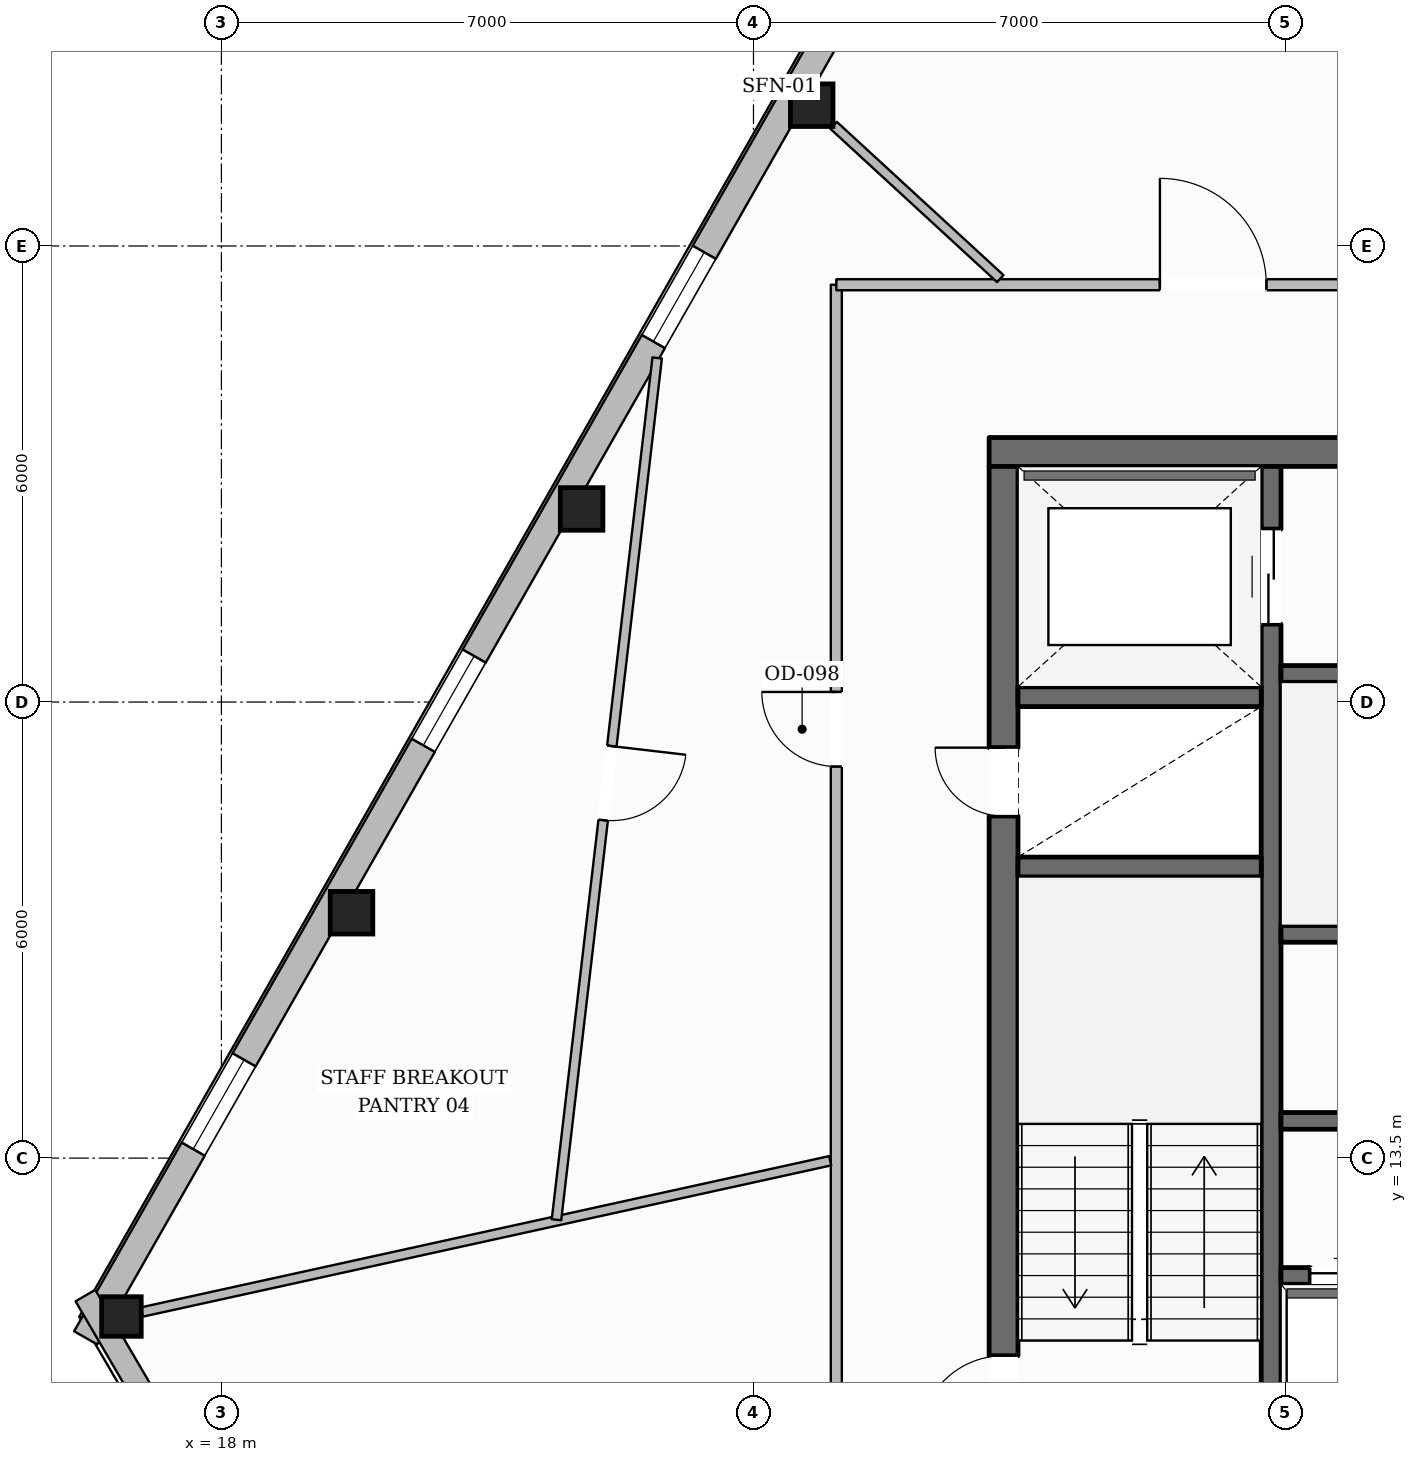
"""IFC4 building model, lengths in metres.
Left out: names, types, materials, properties, quantities, classifications, styles, units other than length and angle.
Written with IfcOpenShell. Run it as: python <this file> out.ifc"""

import sys

from ifc_helpers import new_model, si_unit, direction, frame, frame_2d, origin, origin_2d, place, context, subcontext, project, spatial, rectangle, hollow_rectangle, extrude, element, fill, save


model = new_model("IFC4")
c1 = context("Model", 3, precision=1e-05, world=origin(), true_north=direction((0.0, 1.0)))
c2 = subcontext(c1, "Body", "Model", "MODEL_VIEW")
j1 = project(units=[si_unit("LENGTHUNIT", "METRE"), si_unit("PLANEANGLEUNIT", "RADIAN")], contexts=[c1])
p1 = place(None, origin())
s1 = spatial("IfcSite", under=j1, at=p1, CompositionType="ELEMENT")
p2 = place(p1, origin())
s2 = spatial("IfcBuilding", under=s1, at=p2, CompositionType="ELEMENT")
p3 = place(p2, frame((0.0, 0.0, 254.9)))
s3 = spatial("IfcBuildingStorey", under=s2, at=p3, CompositionType="ELEMENT", Elevation=254.9)
p4 = place(p3, frame((28.1, 22.79, 0.0), z_axis=(0.0, 0.0, 1.0), x_axis=(1.0, 0.0, 0.0)))
e1 = element("IfcWall", 1, at=p4, inside=s3, PredefinedType="SOLIDWALL", context=c2, shape_type="SweptSolid", body=[
    extrude(rectangle(XDim=19.8, YDim=0.38, at=frame_2d((9.9, 0.0))), origin(), (0.0, 0.0, 1.0), 3.61),
])
p5 = place(p4, frame((6.175, 0.0, 0.0)))
e2 = element("IfcOpeningElement", 2, at=p5, cuts=e1, PredefinedType="OPENING", context=c2, shape_type="SweptSolid", body=[
    extrude(rectangle(XDim=1.05, YDim=2.15, at=frame_2d((0.525, 1.075))), frame((0.0, 0.2, 0.0), z_axis=(0.0, -1.0, 0.0), x_axis=(1.0, 0.0, 0.0)), (0.0, 0.0, 1.0), 0.4),
])
p6 = place(p4, frame((12.575, 0.0, 0.0)))
e3 = element("IfcOpeningElement", 3, at=p6, cuts=e1, PredefinedType="OPENING", context=c2, shape_type="SweptSolid", body=[
    extrude(rectangle(XDim=1.05, YDim=2.15, at=frame_2d((0.525, 1.075))), frame((0.0, 0.2, 0.0), z_axis=(0.0, -1.0, 0.0), x_axis=(1.0, 0.0, 0.0)), (0.0, 0.0, 1.0), 0.4),
])
p7 = place(p3, frame((28.29, 9.6, 0.0), z_axis=(0.0, 0.0, 1.0), x_axis=(0.0, 1.0, 0.0)))
e4 = element("IfcWall", 4, at=p7, inside=s3, PredefinedType="SOLIDWALL", context=c2, shape_type="SweptSolid", body=[
    extrude(rectangle(XDim=13.0, YDim=0.38, at=frame_2d((6.5, 0.0))), origin(), (0.0, 0.0, 1.0), 3.61),
])
p8 = place(p7, frame((0.2, 0.0, 0.0)))
e5 = element("IfcOpeningElement", 5, at=p8, cuts=e4, PredefinedType="OPENING", context=c2, shape_type="SweptSolid", body=[
    extrude(rectangle(XDim=1.1, YDim=2.15, at=frame_2d((0.55, 1.075))), frame((0.0, 0.2, 0.0), z_axis=(0.0, -1.0, 0.0), x_axis=(1.0, 0.0, 0.0)), (0.0, 0.0, 1.0), 0.4),
])
p9 = place(p7, frame((8.4, 0.0, 0.0)))
e6 = element("IfcOpeningElement", 6, at=p9, cuts=e4, PredefinedType="OPENING", context=c2, shape_type="SweptSolid", body=[
    extrude(rectangle(XDim=0.9, YDim=2.1, at=frame_2d((0.45, 1.05))), frame((0.0, 0.2, 0.0), z_axis=(0.0, -1.0, 0.0), x_axis=(1.0, 0.0, 0.0)), (0.0, 0.0, 1.0), 0.4),
])
p10 = place(p3, frame((31.81, 9.6, 0.0), z_axis=(0.0, 0.0, 1.0), x_axis=(0.0, 1.0, 0.0)))
e7 = element("IfcWall", 7, at=p10, inside=s3, PredefinedType="SHEAR", context=c2, shape_type="SweptSolid", body=[
    extrude(rectangle(XDim=13.0, YDim=0.26, at=frame_2d((6.5, 0.0))), origin(), (0.0, 0.0, 1.0), 3.61),
])
p11 = place(p10, frame((10.925, 0.0, 0.0)))
e8 = element("IfcOpeningElement", 8, at=p11, cuts=e7, PredefinedType="OPENING", context=c2, shape_type="SweptSolid", body=[
    extrude(rectangle(XDim=1.25, YDim=2.25, at=frame_2d((0.625, 1.125))), frame((0.0, 0.14, 0.0), z_axis=(0.0, -1.0, 0.0), x_axis=(1.0, 0.0, 0.0)), (0.0, 0.0, 1.0), 0.28),
])
for number, where, z_axis, x_axis in (
    (9, (28.48, 17.33, 0.0), (0.0, 0.0, 1.0), (1.0, 0.0, 0.0)),
    (10, (28.48, 19.57, 0.0), (0.0, 0.0, 1.0), (1.0, 0.0, 0.0)),
):
    element("IfcWall", number, at=place(p3, frame(where, z_axis=z_axis, x_axis=x_axis)), inside=s3, PredefinedType="SHEAR", context=c2, shape_type="SweptSolid", body=[
        extrude(rectangle(XDim=3.2, YDim=0.26, at=frame_2d((1.6, 0.0))), origin(), (0.0, 0.0, 1.0), 3.61),
    ])
p12 = place(p3, frame((31.94, 19.87, 0.0), z_axis=(0.0, 0.0, 1.0), x_axis=(1.0, 0.0, 0.0)))
e11 = element("IfcWall", 11, at=p12, inside=s3, PredefinedType="SOLIDWALL", context=c2, shape_type="SweptSolid", body=[
    extrude(rectangle(XDim=12.12, YDim=0.22, at=frame_2d((6.06, 0.0))), origin(), (0.0, 0.0, 1.0), 3.61),
])
p13 = place(p12, frame((6.3, 0.0, 0.0)))
e12 = element("IfcOpeningElement", 12, at=p13, cuts=e11, PredefinedType="OPENING", context=c2, shape_type="SweptSolid", body=[
    extrude(rectangle(XDim=1.1, YDim=2.15, at=frame_2d((0.55, 1.075))), frame((0.0, 0.12, 0.0), z_axis=(0.0, -1.0, 0.0), x_axis=(1.0, 0.0, 0.0)), (0.0, 0.0, 1.0), 0.24),
])
p14 = place(p12, frame((9.51, 0.0, 0.0)))
e13 = element("IfcOpeningElement", 13, at=p14, cuts=e11, PredefinedType="OPENING", context=c2, shape_type="SweptSolid", body=[
    extrude(rectangle(XDim=0.9, YDim=2.1, at=frame_2d((0.45, 1.05))), frame((0.0, 0.12, 0.0), z_axis=(0.0, -1.0, 0.0), x_axis=(1.0, 0.0, 0.0)), (0.0, 0.0, 1.0), 0.24),
])
p15 = place(p3, frame((31.94, 16.45, 0.0), z_axis=(0.0, 0.0, 1.0), x_axis=(1.0, 0.0, 0.0)))
e14 = element("IfcWall", 14, at=p15, inside=s3, PredefinedType="SOLIDWALL", context=c2, shape_type="SweptSolid", body=[
    extrude(rectangle(XDim=12.12, YDim=0.22, at=frame_2d((6.06, 0.0))), origin(), (0.0, 0.0, 1.0), 3.61),
])
p16 = place(p3, frame((31.94, 13.99, 0.0), z_axis=(0.0, 0.0, 1.0), x_axis=(1.0, 0.0, 0.0)))
e15 = element("IfcWall", 15, at=p16, inside=s3, PredefinedType="SOLIDWALL", context=c2, shape_type="SweptSolid", body=[
    extrude(rectangle(XDim=12.12, YDim=0.22, at=frame_2d((6.06, 0.0))), origin(), (0.0, 0.0, 1.0), 3.61),
])
p17 = place(p16, frame((1.11, 0.0, 0.0)))
e16 = element("IfcOpeningElement", 16, at=p17, cuts=e15, PredefinedType="OPENING", context=c2, shape_type="SweptSolid", body=[
    extrude(rectangle(XDim=0.9, YDim=2.1, at=frame_2d((0.45, 1.05))), frame((0.0, 0.12, 0.0), z_axis=(0.0, -1.0, 0.0), x_axis=(1.0, 0.0, 0.0)), (0.0, 0.0, 1.0), 0.24),
])
p18 = place(p16, frame((5.16, 0.0, 0.0)))
e17 = element("IfcOpeningElement", 17, at=p18, cuts=e15, PredefinedType="OPENING", context=c2, shape_type="SweptSolid", body=[
    extrude(rectangle(XDim=0.9, YDim=2.1, at=frame_2d((0.45, 1.05))), frame((0.0, 0.12, 0.0), z_axis=(0.0, -1.0, 0.0), x_axis=(1.0, 0.0, 0.0)), (0.0, 0.0, 1.0), 0.24),
])
p19 = place(p16, frame((9.61, 0.0, 0.0)))
e18 = element("IfcOpeningElement", 18, at=p19, cuts=e15, PredefinedType="OPENING", context=c2, shape_type="SweptSolid", body=[
    extrude(rectangle(XDim=0.9, YDim=2.1, at=frame_2d((0.45, 1.05))), frame((0.0, 0.12, 0.0), z_axis=(0.0, -1.0, 0.0), x_axis=(1.0, 0.0, 0.0)), (0.0, 0.0, 1.0), 0.24),
])
p20 = place(p3, frame((31.94, 11.95, 0.0), z_axis=(0.0, 0.0, 1.0), x_axis=(1.0, 0.0, 0.0)))
e19 = element("IfcWall", 19, at=p20, inside=s3, PredefinedType="SOLIDWALL", context=c2, shape_type="SweptSolid", body=[
    extrude(rectangle(XDim=6.19, YDim=0.22, at=frame_2d((3.095, 0.0))), origin(), (0.0, 0.0, 1.0), 3.61),
])
p21 = place(p20, frame((0.385, 0.0, 0.0)))
e20 = element("IfcOpeningElement", 20, at=p21, cuts=e19, PredefinedType="OPENING", context=c2, shape_type="SweptSolid", body=[
    extrude(rectangle(XDim=1.1, YDim=2.2, at=frame_2d((0.55, 1.1))), frame((0.0, 0.12, 0.0), z_axis=(0.0, -1.0, 0.0), x_axis=(1.0, 0.0, 0.0)), (0.0, 0.0, 1.0), 0.24),
])
p22 = place(p20, frame((2.435, 0.0, 0.0)))
e21 = element("IfcOpeningElement", 21, at=p22, cuts=e19, PredefinedType="OPENING", context=c2, shape_type="SweptSolid", body=[
    extrude(rectangle(XDim=1.1, YDim=2.2, at=frame_2d((0.55, 1.1))), frame((0.0, 0.12, 0.0), z_axis=(0.0, -1.0, 0.0), x_axis=(1.0, 0.0, 0.0)), (0.0, 0.0, 1.0), 0.24),
])
p23 = place(p20, frame((4.485, 0.0, 0.0)))
e22 = element("IfcOpeningElement", 22, at=p23, cuts=e19, PredefinedType="OPENING", context=c2, shape_type="SweptSolid", body=[
    extrude(rectangle(XDim=1.1, YDim=2.2, at=frame_2d((0.55, 1.1))), frame((0.0, 0.12, 0.0), z_axis=(0.0, -1.0, 0.0), x_axis=(1.0, 0.0, 0.0)), (0.0, 0.0, 1.0), 0.24),
])
for number, where, z_axis, x_axis in (
    (23, (25.766, 27.352, 0.0), (0.0, 0.0, 1.0), (1.0, 0.0, 0.0)),
    (24, (22.739, 22.04, 0.0), (0.0, 0.0, 1.0), (1.0, 0.0, 0.0)),
    (25, (19.712, 16.728, 0.0), (0.0, 0.0, 1.0), (1.0, 0.0, 0.0)),
):
    element("IfcColumn", number, at=place(p3, frame(where, z_axis=z_axis, x_axis=x_axis)), inside=s3, PredefinedType="COLUMN", context=c2, shape_type="SweptSolid", body=[
        extrude(hollow_rectangle(XDim=0.56, YDim=0.56, WallThickness=0.025, at=origin_2d()), origin(), (0.0, 0.0, 1.0), 3.61),
    ])
p24 = place(p3, frame((16.685, 11.416, 0.0), z_axis=(0.0, 0.0, 1.0), x_axis=(1.0, 0.0, 0.0)))
e26 = element("IfcColumn", 26, at=p24, inside=s3, PredefinedType="COLUMN", context=c2, shape_type="SweptSolid", body=[
    extrude(hollow_rectangle(XDim=0.52, YDim=0.52, WallThickness=0.024, at=origin_2d()), origin(), (0.0, 0.0, 1.0), 3.61),
])
p25 = place(p3, frame((16.214, 11.135, 0.0), z_axis=(0.0, 0.0, 1.0), x_axis=(0.49510347201, 0.868834018673, 0.0)))
e27 = element("IfcWall", 27, at=p25, inside=s3, PredefinedType="STANDARD", context=c2, shape_type="SweptSolid", body=[
    extrude(rectangle(XDim=37.643, YDim=0.35, at=frame_2d((18.822, 0.0))), origin(), (0.0, 0.0, 1.0), 3.196),
])
p26 = place(p25, frame((33.429, 0.0, 0.65)))
e28 = element("IfcOpeningElement", 28, at=p26, cuts=e27, PredefinedType="OPENING", context=c2, shape_type="SweptSolid", body=[
    extrude(rectangle(XDim=1.35, YDim=1.75, at=frame_2d((0.675, 0.875))), frame((0.0, 0.185, 0.0), z_axis=(0.0, -1.0, 0.0), x_axis=(1.0, 0.0, 0.0)), (0.0, 0.0, 1.0), 0.37),
])
p27 = place(p25, frame((27.315, 0.0, 0.65)))
e29 = element("IfcOpeningElement", 29, at=p27, cuts=e27, PredefinedType="OPENING", context=c2, shape_type="SweptSolid", body=[
    extrude(rectangle(XDim=1.35, YDim=1.75, at=frame_2d((0.675, 0.875))), frame((0.0, 0.185, 0.0), z_axis=(0.0, -1.0, 0.0), x_axis=(1.0, 0.0, 0.0)), (0.0, 0.0, 1.0), 0.37),
])
p28 = place(p25, frame((15.087, 0.0, 0.65)))
e30 = element("IfcOpeningElement", 30, at=p28, cuts=e27, PredefinedType="OPENING", context=c2, shape_type="SweptSolid", body=[
    extrude(rectangle(XDim=1.35, YDim=1.75, at=frame_2d((0.675, 0.875))), frame((0.0, 0.185, 0.0), z_axis=(0.0, -1.0, 0.0), x_axis=(1.0, 0.0, 0.0)), (0.0, 0.0, 1.0), 0.37),
])
p29 = place(p25, frame((8.973, 0.0, 0.65)))
e31 = element("IfcOpeningElement", 31, at=p29, cuts=e27, PredefinedType="OPENING", context=c2, shape_type="SweptSolid", body=[
    extrude(rectangle(XDim=1.35, YDim=1.75, at=frame_2d((0.675, 0.875))), frame((0.0, 0.185, 0.0), z_axis=(0.0, -1.0, 0.0), x_axis=(1.0, 0.0, 0.0)), (0.0, 0.0, 1.0), 0.37),
])
p30 = place(p25, frame((2.859, 0.0, 0.65)))
e32 = element("IfcOpeningElement", 32, at=p30, cuts=e27, PredefinedType="OPENING", context=c2, shape_type="SweptSolid", body=[
    extrude(rectangle(XDim=1.35, YDim=1.75, at=frame_2d((0.675, 0.875))), frame((0.0, 0.185, 0.0), z_axis=(0.0, -1.0, 0.0), x_axis=(1.0, 0.0, 0.0)), (0.0, 0.0, 1.0), 0.37),
])
p31 = place(p3, frame((19.979, 5.248, 0.0), z_axis=(0.0, 0.0, 1.0), x_axis=(-0.50480008765, 0.863236277915, 0.0)))
e33 = element("IfcWall", 33, at=p31, inside=s3, PredefinedType="STANDARD", context=c2, shape_type="SweptSolid", body=[
    extrude(rectangle(XDim=7.464, YDim=0.3, at=frame_2d((3.732, 0.0))), origin(), (0.0, 0.0, 1.0), 3.196),
])
p32 = place(p31, frame((3.207, 0.0, 0.65)))
e34 = element("IfcOpeningElement", 34, at=p32, cuts=e33, PredefinedType="OPENING", context=c2, shape_type="SweptSolid", body=[
    extrude(rectangle(XDim=1.05, YDim=1.7, at=frame_2d((0.525, 0.85))), frame((0.0, 0.16, 0.0), z_axis=(0.0, -1.0, 0.0), x_axis=(1.0, 0.0, 0.0)), (0.0, 0.0, 1.0), 0.32),
])
p33 = place(p3, frame((26.09, 7.21, 0.0), z_axis=(0.0, 0.0, 1.0), x_axis=(0.0, 1.0, 0.0)))
e35 = element("IfcWall", 35, at=p33, inside=s3, PredefinedType="PARTITIONING", context=c2, shape_type="SweptSolid", body=[
    extrude(rectangle(XDim=17.78, YDim=0.145, at=frame_2d((8.89, 0.0))), origin(), (0.0, 0.0, 1.0), 3.349),
])
p34 = place(p33, frame((11.443, 0.0, 0.0)))
e36 = element("IfcOpeningElement", 36, at=p34, cuts=e35, PredefinedType="OPENING", context=c2, shape_type="SweptSolid", body=[
    extrude(rectangle(XDim=0.98, YDim=2.15, at=frame_2d((0.49, 1.075))), frame((0.0, 0.083, 0.0), z_axis=(0.0, -1.0, 0.0), x_axis=(1.0, 0.0, 0.0)), (0.0, 0.0, 1.0), 0.165),
])
p35 = place(p3, frame((26.09, 24.99, 0.0), z_axis=(0.0, 0.0, 1.0), x_axis=(1.0, 0.0, 0.0)))
e37 = element("IfcWall", 37, at=p35, inside=s3, PredefinedType="PARTITIONING", context=c2, shape_type="SweptSolid", body=[
    extrude(rectangle(XDim=17.11, YDim=0.145, at=frame_2d((8.555, 0.0))), origin(), (0.0, 0.0, 1.0), 3.61),
])
p36 = place(p35, frame((8.47, 0.0, 0.0)))
e38 = element("IfcOpeningElement", 38, at=p36, cuts=e37, PredefinedType="OPENING", context=c2, shape_type="SweptSolid", body=[
    extrude(rectangle(XDim=0.88, YDim=2.1, at=frame_2d((0.44, 1.05))), frame((0.0, 0.083, 0.0), z_axis=(0.0, -1.0, 0.0), x_axis=(1.0, 0.0, 0.0)), (0.0, 0.0, 1.0), 0.165),
])
p37 = place(p35, frame((10.99, 0.0, 0.0)))
e39 = element("IfcOpeningElement", 39, at=p37, cuts=e37, PredefinedType="OPENING", context=c2, shape_type="SweptSolid", body=[
    extrude(rectangle(XDim=0.88, YDim=2.1, at=frame_2d((0.44, 1.05))), frame((0.0, 0.083, 0.0), z_axis=(0.0, -1.0, 0.0), x_axis=(1.0, 0.0, 0.0)), (0.0, 0.0, 1.0), 0.165),
])
p38 = place(p35, frame((13.37, 0.0, 0.0)))
e40 = element("IfcOpeningElement", 40, at=p38, cuts=e37, PredefinedType="OPENING", context=c2, shape_type="SweptSolid", body=[
    extrude(rectangle(XDim=0.96, YDim=2.1, at=frame_2d((0.48, 1.05))), frame((0.0, 0.083, 0.0), z_axis=(0.0, -1.0, 0.0), x_axis=(1.0, 0.0, 0.0)), (0.0, 0.0, 1.0), 0.165),
])
p39 = place(p35, frame((4.257, 0.0, 0.0)))
e41 = element("IfcOpeningElement", 41, at=p39, cuts=e37, PredefinedType="OPENING", context=c2, shape_type="SweptSolid", body=[
    extrude(rectangle(XDim=1.4, YDim=2.2, at=frame_2d((0.7, 1.1))), frame((0.0, 0.083, 0.0), z_axis=(0.0, -1.0, 0.0), x_axis=(1.0, 0.0, 0.0)), (0.0, 0.0, 1.0), 0.165),
])
p40 = place(p3, frame((28.247, 25.071, 0.0), z_axis=(0.0, 0.0, 1.0), x_axis=(-0.736030630255, 0.67694823386, 0.0)))
e42 = element("IfcWall", 42, at=p40, inside=s3, PredefinedType="PARTITIONING", context=c2, shape_type="SweptSolid", body=[
    extrude(rectangle(XDim=2.979, YDim=0.125, at=frame_2d((1.49, 0.0))), origin(), (0.0, 0.0, 1.0), 3.61),
])
p41 = place(p3, frame((26.01, 13.465, 0.0), z_axis=(0.0, 0.0, 1.0), x_axis=(-0.976700346334, -0.214607626778, 0.0)))
e43 = element("IfcWall", 43, at=p41, inside=s3, PredefinedType="PARTITIONING", context=c2, shape_type="SweptSolid", body=[
    extrude(rectangle(XDim=9.273, YDim=0.125, at=frame_2d((4.636, 0.0))), origin(), (0.0, 0.0, 1.0), 3.246),
])
p42 = place(p3, frame((23.733, 24.027, 0.0), z_axis=(0.0, 0.0, 1.0), x_axis=(-0.116028401935, -0.993245896012, 0.0)))
e44 = element("IfcWall", 44, at=p42, inside=s3, PredefinedType="PARTITIONING", context=c2, shape_type="SweptSolid", body=[
    extrude(rectangle(XDim=11.415, YDim=0.125, at=frame_2d((5.708, 0.0))), origin(), (0.0, 0.0, 1.0), 3.199),
])
p43 = place(p42, frame((5.142, 0.0, 0.0)))
e45 = element("IfcOpeningElement", 45, at=p43, cuts=e44, PredefinedType="OPENING", context=c2, shape_type="SweptSolid", body=[
    extrude(rectangle(XDim=0.98, YDim=2.15, at=frame_2d((0.49, 1.075))), frame((0.0, 0.073, 0.0), z_axis=(0.0, -1.0, 0.0), x_axis=(1.0, 0.0, 0.0)), (0.0, 0.0, 1.0), 0.145),
])
p44 = place(p28, origin())
e46 = element("IfcWindow", 46, at=p44, inside=s3, PartitioningType="SINGLE_PANEL", PredefinedType="WINDOW", context=c2, shape_type="SweptSolid", body=[
    extrude(rectangle(XDim=1.35, YDim=1.75, at=frame_2d((0.675, 0.875))), frame((0.0, 0.03, 0.0), z_axis=(0.0, -1.0, 0.0), x_axis=(1.0, 0.0, 0.0)), (0.0, 0.0, 1.0), 0.06),
])
fill(e30, e46)
p45 = place(p29, origin())
e47 = element("IfcWindow", 47, at=p45, inside=s3, PartitioningType="SINGLE_PANEL", PredefinedType="WINDOW", context=c2, shape_type="SweptSolid", body=[
    extrude(rectangle(XDim=1.35, YDim=1.75, at=frame_2d((0.675, 0.875))), frame((0.0, 0.03, 0.0), z_axis=(0.0, -1.0, 0.0), x_axis=(1.0, 0.0, 0.0)), (0.0, 0.0, 1.0), 0.06),
])
fill(e31, e47)
p46 = place(p30, origin())
e48 = element("IfcWindow", 48, at=p46, inside=s3, PartitioningType="SINGLE_PANEL", PredefinedType="WINDOW", context=c2, shape_type="SweptSolid", body=[
    extrude(rectangle(XDim=1.35, YDim=1.75, at=frame_2d((0.675, 0.875))), frame((0.0, 0.03, 0.0), z_axis=(0.0, -1.0, 0.0), x_axis=(1.0, 0.0, 0.0)), (0.0, 0.0, 1.0), 0.06),
])
fill(e32, e48)
p47 = place(p8, origin())
e49 = element("IfcDoor", 49, at=p47, inside=s3, OperationType="SINGLE_SWING_LEFT", PredefinedType="DOOR", context=c2, shape_type="SweptSolid", body=[
    extrude(rectangle(XDim=1.1, YDim=2.15, at=frame_2d((0.55, 1.075))), frame((0.0, 0.025, 0.0), z_axis=(0.0, -1.0, 0.0), x_axis=(1.0, 0.0, 0.0)), (0.0, 0.0, 1.0), 0.05),
])
fill(e5, e49)
p48 = place(p9, origin())
e50 = element("IfcDoor", 50, at=p48, inside=s3, OperationType="SINGLE_SWING_RIGHT", PredefinedType="DOOR", context=c2, shape_type="SweptSolid", body=[
    extrude(rectangle(XDim=0.9, YDim=2.1, at=frame_2d((0.45, 1.05))), frame((0.0, 0.025, 0.0), z_axis=(0.0, -1.0, 0.0), x_axis=(1.0, 0.0, 0.0)), (0.0, 0.0, 1.0), 0.05),
])
fill(e6, e50)
p49 = place(p11, origin())
e51 = element("IfcDoor", 51, at=p49, inside=s3, OperationType="DOUBLE_DOOR_SLIDING", PredefinedType="DOOR", context=c2, shape_type="SweptSolid", body=[
    extrude(rectangle(XDim=1.25, YDim=2.25, at=frame_2d((0.625, 1.125))), frame((0.0, 0.025, 0.0), z_axis=(0.0, -1.0, 0.0), x_axis=(1.0, 0.0, 0.0)), (0.0, 0.0, 1.0), 0.05),
])
fill(e8, e51)
p50 = place(p21, origin())
e52 = element("IfcDoor", 52, at=p50, inside=s3, OperationType="DOUBLE_DOOR_SLIDING", PredefinedType="DOOR", context=c2, shape_type="SweptSolid", body=[
    extrude(rectangle(XDim=1.1, YDim=2.2, at=frame_2d((0.55, 1.1))), frame((0.0, 0.025, 0.0), z_axis=(0.0, -1.0, 0.0), x_axis=(1.0, 0.0, 0.0)), (0.0, 0.0, 1.0), 0.05),
])
fill(e20, e52)
p51 = place(p39, origin())
e53 = element("IfcDoor", 53, at=p51, inside=s3, OperationType="SINGLE_SWING_LEFT", PredefinedType="DOOR", context=c2, shape_type="SweptSolid", body=[
    extrude(rectangle(XDim=1.4, YDim=2.2, at=frame_2d((0.7, 1.1))), frame((0.0, 0.025, 0.0), z_axis=(0.0, -1.0, 0.0), x_axis=(1.0, 0.0, 0.0)), (0.0, 0.0, 1.0), 0.05),
])
fill(e41, e53)
p52 = place(p34, origin())
e54 = element("IfcDoor", 54, at=p52, inside=s3, OperationType="SINGLE_SWING_RIGHT", PredefinedType="DOOR", context=c2, shape_type="SweptSolid", body=[
    extrude(rectangle(XDim=0.98, YDim=2.15, at=frame_2d((0.49, 1.075))), frame((0.0, 0.025, 0.0), z_axis=(0.0, -1.0, 0.0), x_axis=(1.0, 0.0, 0.0)), (0.0, 0.0, 1.0), 0.05),
])
fill(e36, e54)
p53 = place(p43, origin())
e55 = element("IfcDoor", 55, at=p53, inside=s3, OperationType="SINGLE_SWING_LEFT", PredefinedType="DOOR", context=c2, shape_type="SweptSolid", body=[
    extrude(rectangle(XDim=0.98, YDim=2.15, at=frame_2d((0.49, 1.075))), frame((0.0, 0.025, 0.0), z_axis=(0.0, -1.0, 0.0), x_axis=(1.0, 0.0, 0.0)), (0.0, 0.0, 1.0), 0.05),
])
fill(e45, e55)
save(model, sys.argv[1])
